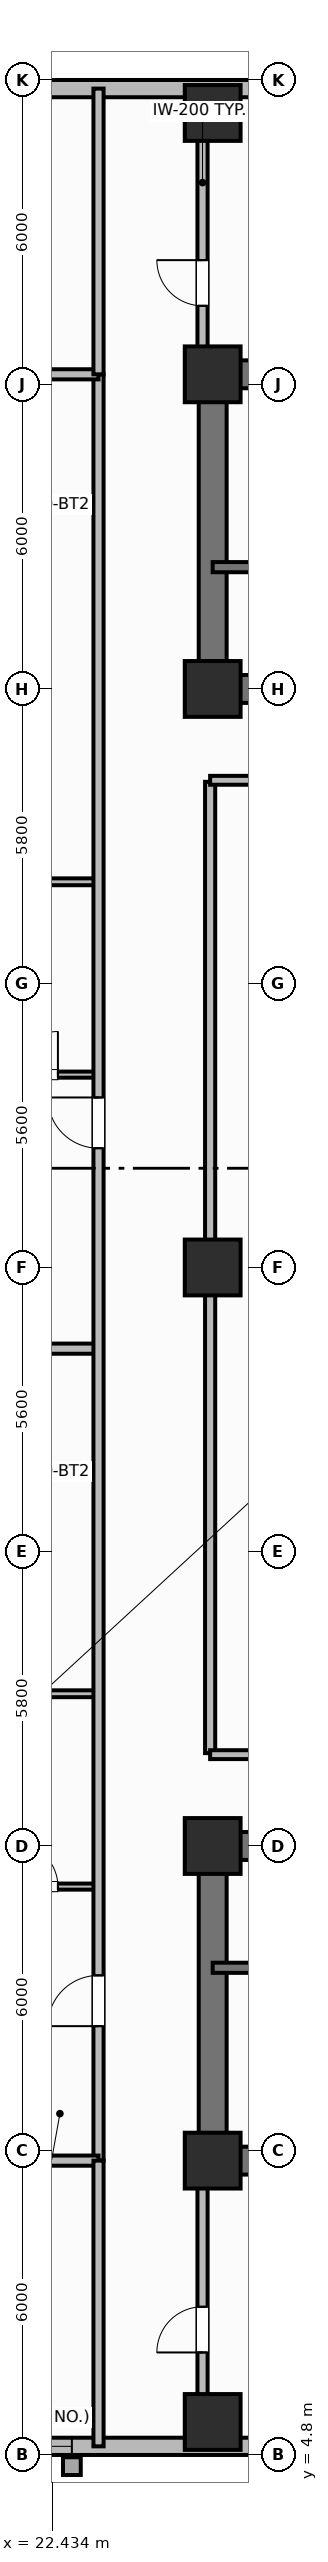
"""IFC4 building model, lengths in metres.
Left out: names, types, materials, properties, quantities, classifications, styles, units other than length and angle.
Written with IfcOpenShell. Run it as: python <this file> out.ifc"""

import sys

from ifc_helpers import new_model, si_unit, direction, frame, frame_2d, origin, origin_2d, place, context, subcontext, project, spatial, rectangle, extrude, element, fill, save


model = new_model("IFC4")
c1 = context("Model", 3, precision=1e-05, world=origin(), true_north=direction((0.0, 1.0)))
c2 = subcontext(c1, "Body", "Model", "MODEL_VIEW")
j1 = project(units=[si_unit("LENGTHUNIT", "METRE"), si_unit("PLANEANGLEUNIT", "RADIAN")], contexts=[c1])
p1 = place(None, origin())
s1 = spatial("IfcSite", under=j1, at=p1, CompositionType="ELEMENT")
p2 = place(p1, origin())
s2 = spatial("IfcBuilding", under=s1, at=p2, CompositionType="ELEMENT")
p3 = place(p2, frame((0.0, 0.0, 117.9)))
s3 = spatial("IfcBuildingStorey", under=s2, at=p3, CompositionType="ELEMENT", Elevation=117.9)
p4 = place(p3, frame((52.8, 10.6, 0.0), z_axis=(0.0, 0.0, 1.0), x_axis=(-1.0, 0.0, 0.0)))
e1 = element("IfcWall", 1, at=p4, inside=s3, PredefinedType="SHEAR", context=c2, shape_type="SweptSolid", body=[
    extrude(rectangle(XDim=27.2, YDim=0.55, at=frame_2d((13.6, 0.0))), origin(), (0.0, 0.0, 1.0), 3.7),
])
p5 = place(p3, frame((25.6, 10.875, 0.0), z_axis=(0.0, 0.0, 1.0), x_axis=(0.0, 1.0, 0.0)))
e2 = element("IfcWall", 2, at=p5, inside=s3, PredefinedType="SHEAR", context=c2, shape_type="SweptSolid", body=[
    extrude(rectangle(XDim=5.65, YDim=0.55, at=frame_2d((2.825, 0.0))), origin(), (0.0, 0.0, 1.0), 3.7),
])
p6 = place(p3, frame((25.6, 16.8, 0.0), z_axis=(0.0, 0.0, 1.0), x_axis=(1.0, 0.0, 0.0)))
e3 = element("IfcWall", 3, at=p6, inside=s3, PredefinedType="SHEAR", context=c2, shape_type="SweptSolid", body=[
    extrude(rectangle(XDim=27.2, YDim=0.55, at=frame_2d((13.6, 0.0))), origin(), (0.0, 0.0, 1.0), 3.7),
])
p7 = place(p6, frame((1.9, 0.0, 0.0)))
e4 = element("IfcOpeningElement", 4, at=p7, cuts=e3, PredefinedType="OPENING", context=c2, shape_type="SweptSolid", body=[
    extrude(rectangle(XDim=1.1, YDim=2.15, at=frame_2d((0.55, 1.075))), frame((0.0, 0.285, 0.0), z_axis=(0.0, -1.0, 0.0), x_axis=(1.0, 0.0, 0.0)), (0.0, 0.0, 1.0), 0.57),
])
p8 = place(p6, frame((13.0, 0.0, 0.0)))
e5 = element("IfcOpeningElement", 5, at=p8, cuts=e3, PredefinedType="OPENING", context=c2, shape_type="SweptSolid", body=[
    extrude(rectangle(XDim=1.2, YDim=2.15, at=frame_2d((0.6, 1.075))), frame((0.0, 0.285, 0.0), z_axis=(0.0, -1.0, 0.0), x_axis=(1.0, 0.0, 0.0)), (0.0, 0.0, 1.0), 0.57),
])
p9 = place(p6, frame((21.6, 0.0, 0.0)))
e6 = element("IfcOpeningElement", 6, at=p9, cuts=e3, PredefinedType="OPENING", context=c2, shape_type="SweptSolid", body=[
    extrude(rectangle(XDim=1.0, YDim=2.15, at=frame_2d((0.5, 1.075))), frame((0.0, 0.285, 0.0), z_axis=(0.0, -1.0, 0.0), x_axis=(1.0, 0.0, 0.0)), (0.0, 0.0, 1.0), 0.57),
])
p10 = place(p3, frame((25.6, 45.8, 0.0), z_axis=(0.0, 0.0, 1.0), x_axis=(1.0, 0.0, 0.0)))
e7 = element("IfcWall", 7, at=p10, inside=s3, PredefinedType="SHEAR", context=c2, shape_type="SweptSolid", body=[
    extrude(rectangle(XDim=27.2, YDim=0.55, at=frame_2d((13.6, 0.0))), origin(), (0.0, 0.0, 1.0), 3.7),
])
p11 = place(p3, frame((25.6, 39.875, 0.0), z_axis=(0.0, 0.0, 1.0), x_axis=(0.0, 1.0, 0.0)))
e8 = element("IfcWall", 8, at=p11, inside=s3, PredefinedType="SHEAR", context=c2, shape_type="SweptSolid", body=[
    extrude(rectangle(XDim=5.65, YDim=0.55, at=frame_2d((2.825, 0.0))), origin(), (0.0, 0.0, 1.0), 3.7),
])
p12 = place(p3, frame((52.8, 39.6, 0.0), z_axis=(0.0, 0.0, 1.0), x_axis=(-1.0, 0.0, 0.0)))
e9 = element("IfcWall", 9, at=p12, inside=s3, PredefinedType="SHEAR", context=c2, shape_type="SweptSolid", body=[
    extrude(rectangle(XDim=27.2, YDim=0.55, at=frame_2d((13.6, 0.0))), origin(), (0.0, 0.0, 1.0), 3.7),
])
p13 = place(p12, frame((24.2, 0.0, 0.0)))
e10 = element("IfcOpeningElement", 10, at=p13, cuts=e9, PredefinedType="OPENING", context=c2, shape_type="SweptSolid", body=[
    extrude(rectangle(XDim=1.1, YDim=2.15, at=frame_2d((0.55, 1.075))), frame((0.0, 0.285, 0.0), z_axis=(0.0, -1.0, 0.0), x_axis=(1.0, 0.0, 0.0)), (0.0, 0.0, 1.0), 0.57),
])
p14 = place(p12, frame((15.1, 0.0, 0.0)))
e11 = element("IfcOpeningElement", 11, at=p14, cuts=e9, PredefinedType="OPENING", context=c2, shape_type="SweptSolid", body=[
    extrude(rectangle(XDim=1.2, YDim=2.15, at=frame_2d((0.6, 1.075))), frame((0.0, 0.285, 0.0), z_axis=(0.0, -1.0, 0.0), x_axis=(1.0, 0.0, 0.0)), (0.0, 0.0, 1.0), 0.57),
])
p15 = place(p12, frame((11.3, 0.0, 0.0)))
e12 = element("IfcOpeningElement", 12, at=p15, cuts=e9, PredefinedType="OPENING", context=c2, shape_type="SweptSolid", body=[
    extrude(rectangle(XDim=1.3, YDim=2.2, at=frame_2d((0.65, 1.1))), frame((0.0, 0.285, 0.0), z_axis=(0.0, -1.0, 0.0), x_axis=(1.0, 0.0, 0.0)), (0.0, 0.0, 1.0), 0.57),
])
p16 = place(p12, frame((7.25, 0.0, 0.0)))
e13 = element("IfcOpeningElement", 13, at=p16, cuts=e9, PredefinedType="OPENING", context=c2, shape_type="SweptSolid", body=[
    extrude(rectangle(XDim=0.85, YDim=2.1, at=frame_2d((0.425, 1.05))), frame((0.0, 0.285, 0.0), z_axis=(0.0, -1.0, 0.0), x_axis=(1.0, 0.0, 0.0)), (0.0, 0.0, 1.0), 0.57),
])
p17 = place(p12, frame((3.0, 0.0, 0.0)))
e14 = element("IfcOpeningElement", 14, at=p17, cuts=e9, PredefinedType="OPENING", context=c2, shape_type="SweptSolid", body=[
    extrude(rectangle(XDim=0.9, YDim=2.1, at=frame_2d((0.45, 1.05))), frame((0.0, 0.285, 0.0), z_axis=(0.0, -1.0, 0.0), x_axis=(1.0, 0.0, 0.0)), (0.0, 0.0, 1.0), 0.57),
])
for number, where, z_axis, x_axis in (
    (15, (25.6, 10.6, 0.0), (0.0, 0.0, 1.0), (1.0, 0.0, 0.0)),
    (16, (25.6, 16.8, 0.0), (0.0, 0.0, 1.0), (1.0, 0.0, 0.0)),
    (17, (25.6, 39.6, 0.0), (0.0, 0.0, 1.0), (1.0, 0.0, 0.0)),
    (18, (25.6, 45.8, 0.0), (0.0, 0.0, 1.0), (1.0, 0.0, 0.0)),
    (19, (25.6, 28.2, 0.0), (0.0, 0.0, 1.0), (1.0, 0.0, 0.0)),
    (20, (25.6, 5.45, 0.0), (0.0, 0.0, 1.0), (1.0, 0.0, 0.0)),
    (21, (25.6, 50.95, 0.0), (0.0, 0.0, 1.0), (1.0, 0.0, 0.0)),
):
    element("IfcColumn", number, at=place(p3, frame(where, z_axis=z_axis, x_axis=x_axis)), inside=s3, PredefinedType="COLUMN", context=c2, shape_type="SweptSolid", body=[
        extrude(rectangle(XDim=1.1, YDim=1.1, at=origin_2d()), origin(), (0.0, 0.0, 1.0), 3.7),
    ])
p18 = place(p3, frame((18.6, 4.97, 0.0), z_axis=(0.0, 0.0, 1.0), x_axis=(1.0, 0.0, 0.0)))
e22 = element("IfcWall", 22, at=p18, inside=s3, PredefinedType="SOLIDWALL", context=c2, shape_type="SweptSolid", body=[
    extrude(rectangle(XDim=8.45, YDim=0.34, at=frame_2d((4.225, 0.0))), origin(), (0.0, 0.0, 1.0), 2.7),
])
p19 = place(p18, frame((2.125, 0.0, 0.68)))
e23 = element("IfcOpeningElement", 23, at=p19, cuts=e22, PredefinedType="OPENING", context=c2, shape_type="SweptSolid", body=[
    extrude(rectangle(XDim=2.1, YDim=1.9, at=frame_2d((1.05, 0.95))), frame((0.0, 0.18, 0.0), z_axis=(0.0, -1.0, 0.0), x_axis=(1.0, 0.0, 0.0)), (0.0, 0.0, 1.0), 0.36),
])
p20 = place(p3, frame((28.35, 51.43, 0.0), z_axis=(0.0, 0.0, 1.0), x_axis=(-1.0, 0.0, 0.0)))
e24 = element("IfcWall", 24, at=p20, inside=s3, PredefinedType="SOLIDWALL", context=c2, shape_type="SweptSolid", body=[
    extrude(rectangle(XDim=9.75, YDim=0.34, at=frame_2d((4.875, 0.0))), origin(), (0.0, 0.0, 1.0), 2.7),
])
p21 = place(p20, frame((6.992, 0.0, 0.73)))
e25 = element("IfcOpeningElement", 25, at=p21, cuts=e24, PredefinedType="OPENING", context=c2, shape_type="SweptSolid", body=[
    extrude(rectangle(XDim=1.4, YDim=1.85, at=frame_2d((0.7, 0.925))), frame((0.0, 0.18, 0.0), z_axis=(0.0, -1.0, 0.0), x_axis=(1.0, 0.0, 0.0)), (0.0, 0.0, 1.0), 0.36),
])
p22 = place(p3, frame((25.6, 14.4, 0.0), z_axis=(0.0, 0.0, 1.0), x_axis=(1.0, 0.0, 0.0)))
e26 = element("IfcWall", 26, at=p22, inside=s3, PredefinedType="SHEAR", context=c2, shape_type="SweptSolid", body=[
    extrude(rectangle(XDim=9.55, YDim=0.2, at=frame_2d((4.775, 0.0))), origin(), (0.0, 0.0, 1.0), 3.7),
])
p23 = place(p22, frame((1.05, 0.0, 0.0)))
e27 = element("IfcOpeningElement", 27, at=p23, cuts=e26, PredefinedType="OPENING", context=c2, shape_type="SweptSolid", body=[
    extrude(rectangle(XDim=1.1, YDim=2.15, at=frame_2d((0.55, 1.075))), frame((0.0, 0.11, 0.0), z_axis=(0.0, -1.0, 0.0), x_axis=(1.0, 0.0, 0.0)), (0.0, 0.0, 1.0), 0.22),
])
p24 = place(p3, frame((35.15, 42.0, 0.0), z_axis=(0.0, 0.0, 1.0), x_axis=(-1.0, 0.0, 0.0)))
e28 = element("IfcWall", 28, at=p24, inside=s3, PredefinedType="SHEAR", context=c2, shape_type="SweptSolid", body=[
    extrude(rectangle(XDim=9.55, YDim=0.2, at=frame_2d((4.775, 0.0))), origin(), (0.0, 0.0, 1.0), 3.7),
])
p25 = place(p24, frame((7.25, 0.0, 0.0)))
e29 = element("IfcOpeningElement", 29, at=p25, cuts=e28, PredefinedType="OPENING", context=c2, shape_type="SweptSolid", body=[
    extrude(rectangle(XDim=1.1, YDim=2.15, at=frame_2d((0.55, 1.075))), frame((0.0, 0.11, 0.0), z_axis=(0.0, -1.0, 0.0), x_axis=(1.0, 0.0, 0.0)), (0.0, 0.0, 1.0), 0.22),
])
p26 = place(p3, frame((25.55, 18.63, 0.0), z_axis=(0.0, 0.0, 1.0), x_axis=(0.0, 1.0, 0.0)))
e30 = element("IfcWall", 30, at=p26, inside=s3, PredefinedType="PARTITIONING", context=c2, shape_type="SweptSolid", body=[
    extrude(rectangle(XDim=19.14, YDim=0.2, at=frame_2d((9.57, 0.0))), origin(), (0.0, 0.0, 1.0), 2.53),
])
for number, where, z_axis, x_axis in (
    (31, (25.55, 18.6, 0.0), (0.0, 0.0, 1.0), (1.0, 0.0, 0.0)),
    (32, (25.55, 37.8, 0.0), (0.0, 0.0, 1.0), (1.0, 0.0, 0.0)),
):
    element("IfcWall", number, at=place(p3, frame(where, z_axis=z_axis, x_axis=x_axis)), inside=s3, PredefinedType="PARTITIONING", context=c2, shape_type="SweptSolid", body=[
        extrude(rectangle(XDim=6.5, YDim=0.175, at=frame_2d((3.25, 0.0))), origin(), (0.0, 0.0, 1.0), 2.53),
    ])
p27 = place(p3, frame((21.1, 16.0, 0.0), z_axis=(0.0, 0.0, 1.0), x_axis=(1.0, 0.0, 0.0)))
e33 = element("IfcWall", 33, at=p27, inside=s3, PredefinedType="PARTITIONING", context=c2, shape_type="SweptSolid", body=[
    extrude(rectangle(XDim=2.25, YDim=0.12, at=frame_2d((1.125, 0.0))), origin(), (0.0, 0.0, 1.0), 2.53),
])
p28 = place(p27, frame((0.6, 0.0, 0.0)))
e34 = element("IfcOpeningElement", 34, at=p28, cuts=e33, PredefinedType="OPENING", context=c2, shape_type="SweptSolid", body=[
    extrude(rectangle(XDim=0.85, YDim=2.1, at=frame_2d((0.425, 1.05))), frame((0.0, 0.07, 0.0), z_axis=(0.0, -1.0, 0.0), x_axis=(1.0, 0.0, 0.0)), (0.0, 0.0, 1.0), 0.14),
])
p29 = place(p3, frame((21.1, 19.8, 0.0), z_axis=(0.0, 0.0, 1.0), x_axis=(1.0, 0.0, 0.0)))
e35 = element("IfcWall", 35, at=p29, inside=s3, PredefinedType="PARTITIONING", context=c2, shape_type="SweptSolid", body=[
    extrude(rectangle(XDim=2.25, YDim=0.135, at=frame_2d((1.125, 0.0))), origin(), (0.0, 0.0, 1.0), 2.53),
])
p30 = place(p3, frame((14.999, 26.6, 0.0), z_axis=(0.0, 0.0, 1.0), x_axis=(1.0, 0.0, 0.0)))
e36 = element("IfcWall", 36, at=p30, inside=s3, PredefinedType="PARTITIONING", context=c2, shape_type="SweptSolid", body=[
    extrude(rectangle(XDim=8.352, YDim=0.2, at=frame_2d((4.176, 0.0))), origin(), (0.0, 0.0, 1.0), 2.53),
])
p31 = place(p3, frame((21.1, 32.0, 0.0), z_axis=(0.0, 0.0, 1.0), x_axis=(1.0, 0.0, 0.0)))
e37 = element("IfcWall", 37, at=p31, inside=s3, PredefinedType="PARTITIONING", context=c2, shape_type="SweptSolid", body=[
    extrude(rectangle(XDim=2.25, YDim=0.12, at=frame_2d((1.125, 0.0))), origin(), (0.0, 0.0, 1.0), 2.53),
])
p32 = place(p31, frame((0.6, 0.0, 0.0)))
e38 = element("IfcOpeningElement", 38, at=p32, cuts=e37, PredefinedType="OPENING", context=c2, shape_type="SweptSolid", body=[
    extrude(rectangle(XDim=0.85, YDim=2.1, at=frame_2d((0.425, 1.05))), frame((0.0, 0.07, 0.0), z_axis=(0.0, -1.0, 0.0), x_axis=(1.0, 0.0, 0.0)), (0.0, 0.0, 1.0), 0.14),
])
p33 = place(p3, frame((21.1, 35.8, 0.0), z_axis=(0.0, 0.0, 1.0), x_axis=(1.0, 0.0, 0.0)))
e39 = element("IfcWall", 39, at=p33, inside=s3, PredefinedType="PARTITIONING", context=c2, shape_type="SweptSolid", body=[
    extrude(rectangle(XDim=2.25, YDim=0.135, at=frame_2d((1.125, 0.0))), origin(), (0.0, 0.0, 1.0), 2.53),
])
p34 = place(p3, frame((23.35, 10.6, 0.0), z_axis=(0.0, 0.0, 1.0), x_axis=(0.0, 1.0, 0.0)))
e40 = element("IfcWall", 40, at=p34, inside=s3, PredefinedType="PARTITIONING", context=c2, shape_type="SweptSolid", body=[
    extrude(rectangle(XDim=35.2, YDim=0.2, at=frame_2d((17.6, 0.0))), origin(), (0.0, 0.0, 1.0), 2.53),
])
p35 = place(p34, frame((2.65, 0.0, 0.0)))
e41 = element("IfcOpeningElement", 41, at=p35, cuts=e40, PredefinedType="OPENING", context=c2, shape_type="SweptSolid", body=[
    extrude(rectangle(XDim=1.0, YDim=2.15, at=frame_2d((0.5, 1.075))), frame((0.0, 0.11, 0.0), z_axis=(0.0, -1.0, 0.0), x_axis=(1.0, 0.0, 0.0)), (0.0, 0.0, 1.0), 0.22),
])
p36 = place(p34, frame((19.95, 0.0, 0.0)))
e42 = element("IfcOpeningElement", 42, at=p36, cuts=e40, PredefinedType="OPENING", context=c2, shape_type="SweptSolid", body=[
    extrude(rectangle(XDim=1.0, YDim=2.15, at=frame_2d((0.5, 1.075))), frame((0.0, 0.11, 0.0), z_axis=(0.0, -1.0, 0.0), x_axis=(1.0, 0.0, 0.0)), (0.0, 0.0, 1.0), 0.22),
])
for number, where, z_axis, x_axis in (
    (43, (14.99, 10.6, 0.0), (0.0, 0.0, 1.0), (1.0, 0.0, 0.0)),
    (44, (14.99, 45.8, 0.0), (0.0, 0.0, 1.0), (1.0, 0.0, 0.0)),
):
    element("IfcWall", number, at=place(p3, frame(where, z_axis=z_axis, x_axis=x_axis)), inside=s3, PredefinedType="PARTITIONING", context=c2, shape_type="SweptSolid", body=[
        extrude(rectangle(XDim=8.36, YDim=0.2, at=frame_2d((4.18, 0.0))), origin(), (0.0, 0.0, 1.0), 2.53),
    ])
p37 = place(p3, frame((23.35, 4.97, 0.0), z_axis=(0.0, 0.0, 1.0), x_axis=(0.0, 1.0, 0.0)))
e45 = element("IfcWall", 45, at=p37, inside=s3, PredefinedType="PARTITIONING", context=c2, shape_type="SweptSolid", body=[
    extrude(rectangle(XDim=5.63, YDim=0.2, at=frame_2d((2.815, 0.0))), origin(), (0.0, 0.0, 1.0), 2.53),
])
p38 = place(p3, frame((23.35, 45.8, 0.0), z_axis=(0.0, 0.0, 1.0), x_axis=(0.0, 1.0, 0.0)))
e46 = element("IfcWall", 46, at=p38, inside=s3, PredefinedType="PARTITIONING", context=c2, shape_type="SweptSolid", body=[
    extrude(rectangle(XDim=5.63, YDim=0.2, at=frame_2d((2.815, 0.0))), origin(), (0.0, 0.0, 1.0), 2.53),
])
p39 = place(p3, frame((25.4, 5.77, 0.0), z_axis=(0.0, 0.0, 1.0), x_axis=(0.0, 1.0, 0.0)))
e47 = element("IfcWall", 47, at=p39, inside=s3, PredefinedType="PARTITIONING", context=c2, shape_type="SweptSolid", body=[
    extrude(rectangle(XDim=4.53, YDim=0.2, at=frame_2d((2.265, 0.0))), origin(), (0.0, 0.0, 1.0), 2.53),
])
p40 = place(p39, frame((1.05, 0.0, 0.0)))
e48 = element("IfcOpeningElement", 48, at=p40, cuts=e47, PredefinedType="OPENING", context=c2, shape_type="SweptSolid", body=[
    extrude(rectangle(XDim=0.9, YDim=2.1, at=frame_2d((0.45, 1.05))), frame((0.0, 0.11, 0.0), z_axis=(0.0, -1.0, 0.0), x_axis=(1.0, 0.0, 0.0)), (0.0, 0.0, 1.0), 0.22),
])
p41 = place(p3, frame((25.4, 46.1, 0.0), z_axis=(0.0, 0.0, 1.0), x_axis=(0.0, 1.0, 0.0)))
e49 = element("IfcWall", 49, at=p41, inside=s3, PredefinedType="PARTITIONING", context=c2, shape_type="SweptSolid", body=[
    extrude(rectangle(XDim=4.53, YDim=0.2, at=frame_2d((2.265, 0.0))), origin(), (0.0, 0.0, 1.0), 2.53),
])
p42 = place(p41, frame((1.05, 0.0, 0.0)))
e50 = element("IfcOpeningElement", 50, at=p42, cuts=e49, PredefinedType="OPENING", context=c2, shape_type="SweptSolid", body=[
    extrude(rectangle(XDim=0.9, YDim=2.1, at=frame_2d((0.45, 1.05))), frame((0.0, 0.11, 0.0), z_axis=(0.0, -1.0, 0.0), x_axis=(1.0, 0.0, 0.0)), (0.0, 0.0, 1.0), 0.22),
])
p43 = place(p19, origin())
e51 = element("IfcWindow", 51, at=p43, inside=s3, PartitioningType="SINGLE_PANEL", PredefinedType="WINDOW", context=c2, shape_type="SweptSolid", body=[
    extrude(rectangle(XDim=2.1, YDim=1.9, at=frame_2d((1.05, 0.95))), frame((0.0, 0.03, 0.0), z_axis=(0.0, -1.0, 0.0), x_axis=(1.0, 0.0, 0.0)), (0.0, 0.0, 1.0), 0.06),
])
fill(e23, e51)
p44 = place(p28, origin())
e52 = element("IfcDoor", 52, at=p44, inside=s3, OperationType="SINGLE_SWING_LEFT", PredefinedType="DOOR", context=c2, shape_type="SweptSolid", body=[
    extrude(rectangle(XDim=0.85, YDim=2.1, at=frame_2d((0.425, 1.05))), frame((0.0, 0.025, 0.0), z_axis=(0.0, -1.0, 0.0), x_axis=(1.0, 0.0, 0.0)), (0.0, 0.0, 1.0), 0.05),
])
fill(e34, e52)
p45 = place(p32, origin())
e53 = element("IfcDoor", 53, at=p45, inside=s3, OperationType="SINGLE_SWING_RIGHT", PredefinedType="DOOR", context=c2, shape_type="SweptSolid", body=[
    extrude(rectangle(XDim=0.85, YDim=2.1, at=frame_2d((0.425, 1.05))), frame((0.0, 0.025, 0.0), z_axis=(0.0, -1.0, 0.0), x_axis=(1.0, 0.0, 0.0)), (0.0, 0.0, 1.0), 0.05),
])
fill(e38, e53)
p46 = place(p35, origin())
e54 = element("IfcDoor", 54, at=p46, inside=s3, OperationType="SINGLE_SWING_LEFT", PredefinedType="DOOR", context=c2, shape_type="SweptSolid", body=[
    extrude(rectangle(XDim=1.0, YDim=2.15, at=frame_2d((0.5, 1.075))), frame((0.0, 0.025, 0.0), z_axis=(0.0, -1.0, 0.0), x_axis=(1.0, 0.0, 0.0)), (0.0, 0.0, 1.0), 0.05),
])
fill(e41, e54)
p47 = place(p36, origin())
e55 = element("IfcDoor", 55, at=p47, inside=s3, OperationType="SINGLE_SWING_RIGHT", PredefinedType="DOOR", context=c2, shape_type="SweptSolid", body=[
    extrude(rectangle(XDim=1.0, YDim=2.15, at=frame_2d((0.5, 1.075))), frame((0.0, 0.025, 0.0), z_axis=(0.0, -1.0, 0.0), x_axis=(1.0, 0.0, 0.0)), (0.0, 0.0, 1.0), 0.05),
])
fill(e42, e55)
p48 = place(p40, origin())
e56 = element("IfcDoor", 56, at=p48, inside=s3, OperationType="SINGLE_SWING_LEFT", PredefinedType="DOOR", context=c2, shape_type="SweptSolid", body=[
    extrude(rectangle(XDim=0.9, YDim=2.1, at=frame_2d((0.45, 1.05))), frame((0.0, 0.025, 0.0), z_axis=(0.0, -1.0, 0.0), x_axis=(1.0, 0.0, 0.0)), (0.0, 0.0, 1.0), 0.05),
])
fill(e48, e56)
p49 = place(p42, origin())
e57 = element("IfcDoor", 57, at=p49, inside=s3, OperationType="SINGLE_SWING_RIGHT", PredefinedType="DOOR", context=c2, shape_type="SweptSolid", body=[
    extrude(rectangle(XDim=0.9, YDim=2.1, at=frame_2d((0.45, 1.05))), frame((0.0, 0.025, 0.0), z_axis=(0.0, -1.0, 0.0), x_axis=(1.0, 0.0, 0.0)), (0.0, 0.0, 1.0), 0.05),
])
fill(e50, e57)
save(model, sys.argv[1])
